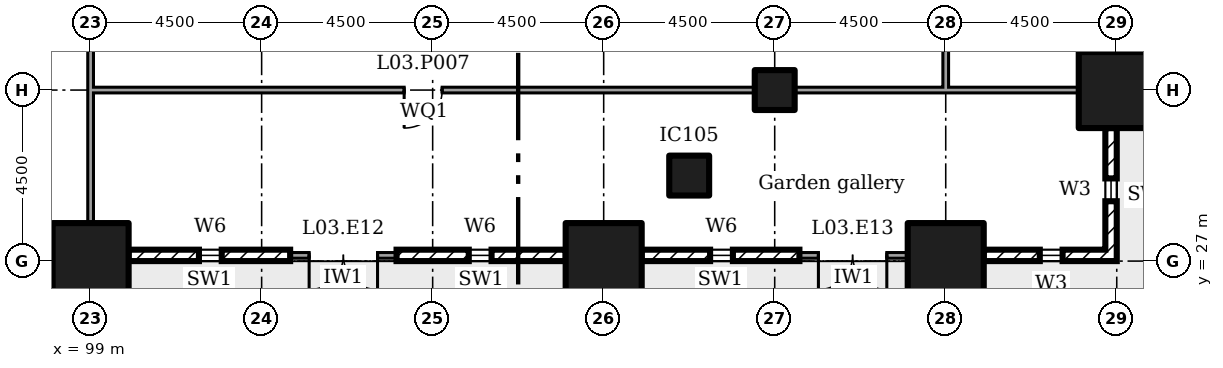
"""IFC4 building model, lengths in metres.
Left out: names, types, materials, properties, quantities, classifications, styles, units other than length and angle.
Written with IfcOpenShell. Run it as: python <this file> out.ifc"""

import sys

from ifc_helpers import new_model, si_unit, direction, frame, frame_2d, origin, origin_2d, place, context, subcontext, project, spatial, rectangle, extrude, element, fill, save


model = new_model("IFC4")
c1 = context("Model", 3, precision=1e-05, world=origin(), true_north=direction((0.0, 1.0)))
c2 = subcontext(c1, "Body", "Model", "MODEL_VIEW")
j1 = project(units=[si_unit("LENGTHUNIT", "METRE"), si_unit("PLANEANGLEUNIT", "RADIAN")], contexts=[c1])
p1 = place(None, origin())
s1 = spatial("IfcSite", under=j1, at=p1, CompositionType="ELEMENT")
p2 = place(p1, origin())
s2 = spatial("IfcBuilding", under=s1, at=p2, CompositionType="ELEMENT")
p3 = place(p2, frame((0.0, 0.0, 16.5)))
s3 = spatial("IfcBuildingStorey", under=s2, at=p3, CompositionType="ELEMENT", Elevation=16.5)
for number, where in (
    (1, (99.0, 27.0, 0.0)),
    (2, (112.5, 27.0, 0.0)),
    (3, (121.5, 27.0, 0.0)),
    (4, (126.0, 31.5, 0.0)),
):
    element("IfcColumn", number, at=place(p3, frame(where)), inside=s3, PredefinedType="COLUMN", context=c2, shape_type="SweptSolid", body=[
        extrude(rectangle(XDim=2.0, YDim=2.0, at=origin_2d()), origin(), (0.0, 0.0, 1.0), 4.5),
    ])
for number, where in (
    (5, (114.75, 29.25, 0.0)),
    (6, (117.0, 31.5, 0.0)),
):
    element("IfcColumn", number, at=place(p3, frame(where)), inside=s3, PredefinedType="COLUMN", context=c2, shape_type="SweptSolid", body=[
        extrude(rectangle(XDim=1.05, YDim=1.05, at=origin_2d()), origin(), (0.0, 0.0, 1.0), 4.5),
    ])
p4 = place(p3, frame((100.0, 27.15, 0.0)))
e7 = element("IfcWall", 7, at=p4, inside=s3, PredefinedType="ELEMENTEDWALL", context=c2, shape_type="SweptSolid", body=[
    extrude(rectangle(XDim=4.25, YDim=0.3, at=frame_2d((2.125, 0.0))), origin(), (0.0, 0.0, 1.0), 2.25),
])
p5 = place(p4, frame((1.85, 0.0, 0.45)))
e8 = element("IfcOpeningElement", 8, at=p5, cuts=e7, PredefinedType="OPENING", context=c2, shape_type="SweptSolid", body=[
    extrude(rectangle(XDim=0.6, YDim=1.7, at=frame_2d((0.3, 0.85))), frame((0.0, 0.16, 0.0), z_axis=(0.0, -1.0, 0.0), x_axis=(1.0, 0.0, 0.0)), (0.0, 0.0, 1.0), 0.32),
])
p6 = place(p3, frame((104.25, 27.15, 0.0)))
e9 = element("IfcWall", 9, at=p6, inside=s3, PredefinedType="SOLIDWALL", context=c2, shape_type="SweptSolid", body=[
    extrude(rectangle(XDim=2.8, YDim=0.15, at=frame_2d((1.4, 0.0))), origin(), (0.0, 0.0, 1.0), 2.25),
])
p7 = place(p6, frame((0.5, 0.0, 0.0)))
e10 = element("IfcOpeningElement", 10, at=p7, cuts=e9, PredefinedType="OPENING", context=c2, shape_type="SweptSolid", body=[
    extrude(rectangle(XDim=1.8, YDim=2.1, at=frame_2d((0.9, 1.05))), frame((0.0, 0.085, 0.0), z_axis=(0.0, -1.0, 0.0), x_axis=(1.0, 0.0, 0.0)), (0.0, 0.0, 1.0), 0.17),
])
p8 = place(p3, frame((107.05, 27.15, 0.0)))
e11 = element("IfcWall", 11, at=p8, inside=s3, PredefinedType="ELEMENTEDWALL", context=c2, shape_type="SweptSolid", body=[
    extrude(rectangle(XDim=4.45, YDim=0.3, at=frame_2d((2.225, 0.0))), origin(), (0.0, 0.0, 1.0), 2.25),
])
p9 = place(p8, frame((1.9, 0.0, 0.45)))
e12 = element("IfcOpeningElement", 12, at=p9, cuts=e11, PredefinedType="OPENING", context=c2, shape_type="SweptSolid", body=[
    extrude(rectangle(XDim=0.6, YDim=1.7, at=frame_2d((0.3, 0.85))), frame((0.0, 0.16, 0.0), z_axis=(0.0, -1.0, 0.0), x_axis=(1.0, 0.0, 0.0)), (0.0, 0.0, 1.0), 0.32),
])
p10 = place(p3, frame((113.5, 27.15, 0.0)))
e13 = element("IfcWall", 13, at=p10, inside=s3, PredefinedType="ELEMENTEDWALL", context=c2, shape_type="SweptSolid", body=[
    extrude(rectangle(XDim=4.15, YDim=0.3, at=frame_2d((2.075, 0.0))), origin(), (0.0, 0.0, 1.0), 2.25),
])
p11 = place(p10, frame((1.8, 0.0, 0.45)))
e14 = element("IfcOpeningElement", 14, at=p11, cuts=e13, PredefinedType="OPENING", context=c2, shape_type="SweptSolid", body=[
    extrude(rectangle(XDim=0.6, YDim=1.7, at=frame_2d((0.3, 0.85))), frame((0.0, 0.16, 0.0), z_axis=(0.0, -1.0, 0.0), x_axis=(1.0, 0.0, 0.0)), (0.0, 0.0, 1.0), 0.32),
])
p12 = place(p3, frame((117.65, 27.15, 0.0)))
e15 = element("IfcWall", 15, at=p12, inside=s3, PredefinedType="SOLIDWALL", context=c2, shape_type="SweptSolid", body=[
    extrude(rectangle(XDim=2.85, YDim=0.15, at=frame_2d((1.425, 0.0))), origin(), (0.0, 0.0, 1.0), 2.25),
])
p13 = place(p12, frame((0.5, 0.0, 0.0)))
e16 = element("IfcOpeningElement", 16, at=p13, cuts=e15, PredefinedType="OPENING", context=c2, shape_type="SweptSolid", body=[
    extrude(rectangle(XDim=1.8, YDim=2.1, at=frame_2d((0.9, 1.05))), frame((0.0, 0.085, 0.0), z_axis=(0.0, -1.0, 0.0), x_axis=(1.0, 0.0, 0.0)), (0.0, 0.0, 1.0), 0.17),
])
p14 = place(p3, frame((122.5, 27.15, 0.0)))
e17 = element("IfcWall", 17, at=p14, inside=s3, PredefinedType="ELEMENTEDWALL", context=c2, shape_type="SweptSolid", body=[
    extrude(rectangle(XDim=3.2, YDim=0.3, at=frame_2d((1.6, 0.0))), origin(), (0.0, 0.0, 1.0), 4.05),
])
p15 = place(p14, frame((1.475, 0.0, 0.45)))
e18 = element("IfcOpeningElement", 18, at=p15, cuts=e17, PredefinedType="OPENING", context=c2, shape_type="SweptSolid", body=[
    extrude(rectangle(XDim=0.6, YDim=2.4, at=frame_2d((0.3, 1.2))), frame((0.0, 0.16, 0.0), z_axis=(0.0, -1.0, 0.0), x_axis=(1.0, 0.0, 0.0)), (0.0, 0.0, 1.0), 0.32),
])
p16 = place(p3, frame((125.85, 27.0, 0.0), z_axis=(0.0, 0.0, 1.0), x_axis=(0.0, 1.0, 0.0)))
e19 = element("IfcWall", 19, at=p16, inside=s3, PredefinedType="ELEMENTEDWALL", context=c2, shape_type="SweptSolid", body=[
    extrude(rectangle(XDim=3.5, YDim=0.3, at=frame_2d((1.75, 0.0))), origin(), (0.0, 0.0, 1.0), 4.05),
])
p17 = place(p16, frame((1.575, 0.0, 0.45)))
e20 = element("IfcOpeningElement", 20, at=p17, cuts=e19, PredefinedType="OPENING", context=c2, shape_type="SweptSolid", body=[
    extrude(rectangle(XDim=0.6, YDim=2.4, at=frame_2d((0.3, 1.2))), frame((0.0, 0.16, 0.0), z_axis=(0.0, -1.0, 0.0), x_axis=(1.0, 0.0, 0.0)), (0.0, 0.0, 1.0), 0.32),
])
p18 = place(p3, frame((99.0, 31.425, 0.0), z_axis=(0.0, 0.0, 1.0), x_axis=(0.0, 1.0, 0.0)))
e21 = element("IfcWall", 21, at=p18, inside=s3, PredefinedType="PARTITIONING", context=c2, shape_type="SweptSolid", body=[
    extrude(rectangle(XDim=4.055, YDim=0.15, at=frame_2d((2.027, 0.0))), origin(), (0.0, 0.0, 1.0), 4.05),
])
p19 = place(p18, frame((1.175, 0.0, 0.0)))
e22 = element("IfcOpeningElement", 22, at=p19, cuts=e21, PredefinedType="OPENING", context=c2, shape_type="SweptSolid", body=[
    extrude(rectangle(XDim=1.8, YDim=2.1, at=frame_2d((0.9, 1.05))), frame((0.0, 0.085, 0.0), z_axis=(0.0, -1.0, 0.0), x_axis=(1.0, 0.0, 0.0)), (0.0, 0.0, 1.0), 0.17),
])
p20 = place(p3, frame((99.0, 27.995, 0.0), z_axis=(0.0, 0.0, 1.0), x_axis=(0.0, 1.0, 0.0)))
e23 = element("IfcWall", 23, at=p20, inside=s3, PredefinedType="PARTITIONING", context=c2, shape_type="SweptSolid", body=[
    extrude(rectangle(XDim=3.505, YDim=0.15, at=frame_2d((1.752, 0.0))), origin(), (0.0, 0.0, 1.0), 4.05),
])
p21 = place(p3, frame((99.075, 31.5, 0.0)))
e24 = element("IfcWall", 24, at=p21, inside=s3, PredefinedType="PARTITIONING", context=c2, shape_type="SweptSolid", body=[
    extrude(rectangle(XDim=17.405, YDim=0.15, at=frame_2d((8.703, 0.0))), origin(), (0.0, 0.0, 1.0), 4.05),
])
p22 = place(p21, frame((8.175, 0.0, 0.0)))
e25 = element("IfcOpeningElement", 25, at=p22, cuts=e24, PredefinedType="OPENING", context=c2, shape_type="SweptSolid", body=[
    extrude(rectangle(XDim=1.0, YDim=2.1, at=frame_2d((0.5, 1.05))), frame((0.0, 0.085, 0.0), z_axis=(0.0, -1.0, 0.0), x_axis=(1.0, 0.0, 0.0)), (0.0, 0.0, 1.0), 0.17),
])
p23 = place(p3, frame((117.52, 31.5, 0.0)))
e26 = element("IfcWall", 26, at=p23, inside=s3, PredefinedType="PARTITIONING", context=c2, shape_type="SweptSolid", body=[
    extrude(rectangle(XDim=4.055, YDim=0.15, at=frame_2d((2.027, 0.0))), origin(), (0.0, 0.0, 1.0), 4.05),
])
p24 = place(p3, frame((121.5, 31.575, 0.0), z_axis=(0.0, 0.0, 1.0), x_axis=(0.0, 1.0, 0.0)))
e27 = element("IfcWall", 27, at=p24, inside=s3, PredefinedType="PARTITIONING", context=c2, shape_type="SweptSolid", body=[
    extrude(rectangle(XDim=17.405, YDim=0.15, at=frame_2d((8.703, 0.0))), origin(), (0.0, 0.0, 1.0), 4.05),
])
p25 = place(p24, frame((8.175, 0.0, 0.0)))
e28 = element("IfcOpeningElement", 28, at=p25, cuts=e27, PredefinedType="OPENING", context=c2, shape_type="SweptSolid", body=[
    extrude(rectangle(XDim=1.0, YDim=2.1, at=frame_2d((0.5, 1.05))), frame((0.0, 0.085, 0.0), z_axis=(0.0, -1.0, 0.0), x_axis=(1.0, 0.0, 0.0)), (0.0, 0.0, 1.0), 0.17),
])
p26 = place(p3, frame((121.5, 31.5, 0.0)))
e29 = element("IfcWall", 29, at=p26, inside=s3, PredefinedType="PARTITIONING", context=c2, shape_type="SweptSolid", body=[
    extrude(rectangle(XDim=3.505, YDim=0.15, at=frame_2d((1.752, 0.0))), origin(), (0.0, 0.0, 1.0), 4.05),
])
p27 = place(p5, origin())
e30 = element("IfcWindow", 30, at=p27, inside=s3, PartitioningType="SINGLE_PANEL", PredefinedType="WINDOW", context=c2, shape_type="SweptSolid", body=[
    extrude(rectangle(XDim=0.6, YDim=1.7, at=frame_2d((0.3, 0.85))), frame((0.0, 0.03, 0.0), z_axis=(0.0, -1.0, 0.0), x_axis=(1.0, 0.0, 0.0)), (0.0, 0.0, 1.0), 0.06),
])
fill(e8, e30)
p28 = place(p7, frame((1.8, 0.0, 0.0), x_axis=(-1.0, 0.0, 0.0)))
e31 = element("IfcDoor", 31, at=p28, inside=s3, OperationType="DOUBLE_DOOR_DOUBLE_SWING", PredefinedType="NOTDEFINED", context=c2, shape_type="SweptSolid", body=[
    extrude(rectangle(XDim=1.8, YDim=2.1, at=frame_2d((0.9, 1.05))), frame((0.0, 0.025, 0.0), z_axis=(0.0, -1.0, 0.0), x_axis=(1.0, 0.0, 0.0)), (0.0, 0.0, 1.0), 0.05),
])
fill(e10, e31)
p29 = place(p9, origin())
e32 = element("IfcWindow", 32, at=p29, inside=s3, PartitioningType="SINGLE_PANEL", PredefinedType="WINDOW", context=c2, shape_type="SweptSolid", body=[
    extrude(rectangle(XDim=0.6, YDim=1.7, at=frame_2d((0.3, 0.85))), frame((0.0, 0.03, 0.0), z_axis=(0.0, -1.0, 0.0), x_axis=(1.0, 0.0, 0.0)), (0.0, 0.0, 1.0), 0.06),
])
fill(e12, e32)
p30 = place(p11, origin())
e33 = element("IfcWindow", 33, at=p30, inside=s3, PartitioningType="SINGLE_PANEL", PredefinedType="WINDOW", context=c2, shape_type="SweptSolid", body=[
    extrude(rectangle(XDim=0.6, YDim=1.7, at=frame_2d((0.3, 0.85))), frame((0.0, 0.03, 0.0), z_axis=(0.0, -1.0, 0.0), x_axis=(1.0, 0.0, 0.0)), (0.0, 0.0, 1.0), 0.06),
])
fill(e14, e33)
p31 = place(p13, frame((1.8, 0.0, 0.0), x_axis=(-1.0, 0.0, 0.0)))
e34 = element("IfcDoor", 34, at=p31, inside=s3, OperationType="DOUBLE_DOOR_DOUBLE_SWING", PredefinedType="NOTDEFINED", context=c2, shape_type="SweptSolid", body=[
    extrude(rectangle(XDim=1.8, YDim=2.1, at=frame_2d((0.9, 1.05))), frame((0.0, 0.025, 0.0), z_axis=(0.0, -1.0, 0.0), x_axis=(1.0, 0.0, 0.0)), (0.0, 0.0, 1.0), 0.05),
])
fill(e16, e34)
p32 = place(p15, origin())
e35 = element("IfcWindow", 35, at=p32, inside=s3, PartitioningType="SINGLE_PANEL", PredefinedType="WINDOW", context=c2, shape_type="SweptSolid", body=[
    extrude(rectangle(XDim=0.6, YDim=2.4, at=frame_2d((0.3, 1.2))), frame((0.0, 0.03, 0.0), z_axis=(0.0, -1.0, 0.0), x_axis=(1.0, 0.0, 0.0)), (0.0, 0.0, 1.0), 0.06),
])
fill(e18, e35)
p33 = place(p17, origin())
e36 = element("IfcWindow", 36, at=p33, inside=s3, PartitioningType="SINGLE_PANEL", PredefinedType="WINDOW", context=c2, shape_type="SweptSolid", body=[
    extrude(rectangle(XDim=0.6, YDim=2.4, at=frame_2d((0.3, 1.2))), frame((0.0, 0.03, 0.0), z_axis=(0.0, -1.0, 0.0), x_axis=(1.0, 0.0, 0.0)), (0.0, 0.0, 1.0), 0.06),
])
fill(e20, e36)
p34 = place(p22, frame((1.0, 0.0, 0.0), x_axis=(-1.0, 0.0, 0.0)))
e37 = element("IfcDoor", 37, at=p34, inside=s3, OperationType="SINGLE_SWING_LEFT", PredefinedType="DOOR", context=c2, shape_type="SweptSolid", body=[
    extrude(rectangle(XDim=1.0, YDim=2.1, at=frame_2d((0.5, 1.05))), frame((0.0, 0.025, 0.0), z_axis=(0.0, -1.0, 0.0), x_axis=(1.0, 0.0, 0.0)), (0.0, 0.0, 1.0), 0.05),
])
fill(e25, e37)
save(model, sys.argv[1])
